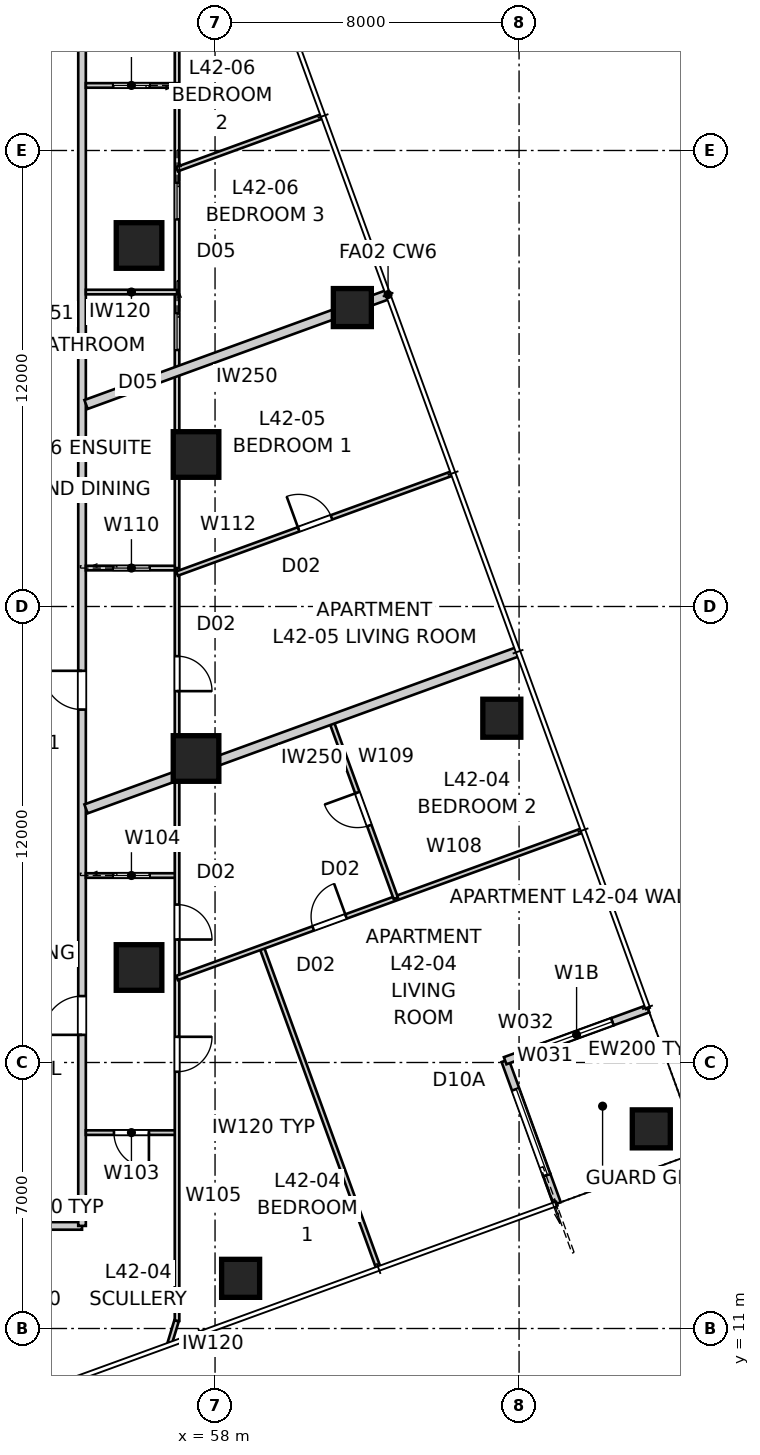
"""IFC4 building model, lengths in metres.
Left out: names, types, materials, properties, quantities, classifications, styles, units other than length and angle.
Written with IfcOpenShell. Run it as: python <this file> out.ifc"""

import sys

from ifc_helpers import new_model, si_unit, direction, frame, frame_2d, origin, origin_2d, place, context, subcontext, project, spatial, rectangle, extrude, element, fill, save


model = new_model("IFC4")
c1 = context("Model", 3, precision=1e-05, world=origin(), true_north=direction((0.0, 1.0)))
c2 = subcontext(c1, "Body", "Model", "MODEL_VIEW")
j1 = project(units=[si_unit("LENGTHUNIT", "METRE"), si_unit("PLANEANGLEUNIT", "RADIAN")], contexts=[c1])
p1 = place(None, origin())
s1 = spatial("IfcSite", under=j1, at=p1, CompositionType="ELEMENT")
p2 = place(p1, origin())
s2 = spatial("IfcBuilding", under=s1, at=p2, CompositionType="ELEMENT")
p3 = place(p2, frame((0.0, 0.0, 154.0)))
s3 = spatial("IfcBuildingStorey", under=s2, at=p3, CompositionType="ELEMENT", Elevation=154.0)
for number, where, z_axis, x_axis in (
    (1, (58.673, 12.32, 0.0), (0.0, 0.0, 1.0), (1.0, 0.0, 0.0)),
    (2, (69.479, 16.253, 0.0), (0.0, 0.0, 1.0), (1.0, 0.0, 0.0)),
    (3, (65.546, 27.06, 0.0), (0.0, 0.0, 1.0), (1.0, 0.0, 0.0)),
    (4, (61.613, 37.866, 0.0), (0.0, 0.0, 1.0), (1.0, 0.0, 0.0)),
):
    element("IfcColumn", number, at=place(p3, frame(where, z_axis=z_axis, x_axis=x_axis)), inside=s3, PredefinedType="COLUMN", context=c2, shape_type="SweptSolid", body=[
        extrude(rectangle(XDim=1.0, YDim=1.0, at=origin_2d()), origin(), (0.0, 0.0, 1.0), 3.4),
    ])
for number, where, z_axis, x_axis in (
    (5, (57.5, 26.0, 0.0), (0.0, 0.0, 1.0), (1.0, 0.0, 0.0)),
    (6, (57.5, 34.0, 0.0), (0.0, 0.0, 1.0), (1.0, 0.0, 0.0)),
    (7, (56.0, 39.5, 0.0), (0.0, 0.0, 1.0), (1.0, 0.0, 0.0)),
    (8, (56.0, 20.5, 0.0), (0.0, 0.0, 1.0), (1.0, 0.0, 0.0)),
):
    element("IfcColumn", number, at=place(p3, frame(where, z_axis=z_axis, x_axis=x_axis)), inside=s3, PredefinedType="COLUMN", context=c2, shape_type="SweptSolid", body=[
        extrude(rectangle(XDim=1.2, YDim=1.2, at=origin_2d()), origin(), (0.0, 0.0, 1.0), 3.4),
    ])
p4 = place(p3, frame((67.002, 14.288, 0.0), z_axis=(0.0, 0.0, 1.0), x_axis=(-0.342110593602, 0.939659694648, 0.0)))
e9 = element("IfcWall", 9, at=p4, inside=s3, PredefinedType="SOLIDWALL", context=c2, shape_type="SweptSolid", body=[
    extrude(rectangle(XDim=0.8, YDim=0.2, at=frame_2d((0.4, 0.0))), origin(), (0.0, 0.0, 1.0), 3.25),
])
p5 = place(p3, frame((66.729, 15.04, 0.0), z_axis=(0.0, 0.0, 1.0), x_axis=(-0.342018703306, 0.939693144909, 0.0)))
e10 = element("IfcWall", 10, at=p5, inside=s3, PredefinedType="SOLIDWALL", context=c2, shape_type="SweptSolid", body=[
    extrude(rectangle(XDim=3.2, YDim=0.2, at=frame_2d((1.6, 0.0))), origin(), (0.0, 0.0, 1.0), 2.721),
])
p6 = place(p5, origin())
e11 = element("IfcOpeningElement", 11, at=p6, cuts=e10, PredefinedType="OPENING", context=c2, shape_type="SweptSolid", body=[
    extrude(rectangle(XDim=2.4, YDim=2.1, at=frame_2d((1.2, 1.05))), frame((0.0, 0.11, 0.0), z_axis=(0.0, -1.0, 0.0), x_axis=(1.0, 0.0, 0.0)), (0.0, 0.0, 1.0), 0.22),
])
p7 = place(p3, frame((65.634, 18.047, 0.0), z_axis=(0.0, 0.0, 1.0), x_axis=(0.939712609717, 0.341965219194, 0.0)))
e12 = element("IfcWall", 12, at=p7, inside=s3, PredefinedType="SOLIDWALL", context=c2, shape_type="SweptSolid", body=[
    extrude(rectangle(XDim=3.0, YDim=0.2, at=frame_2d((1.5, 0.0))), origin(), (0.0, 0.0, 1.0), 2.721),
])
p8 = place(p7, frame((1.0, 0.0, 0.45)))
e13 = element("IfcOpeningElement", 13, at=p8, cuts=e12, PredefinedType="OPENING", context=c2, shape_type="SweptSolid", body=[
    extrude(rectangle(XDim=2.0, YDim=1.8, at=frame_2d((1.0, 0.9))), frame((0.0, 0.11, 0.0), z_axis=(0.0, -1.0, 0.0), x_axis=(1.0, 0.0, 0.0)), (0.0, 0.0, 1.0), 0.22),
])
p9 = place(p3, frame((68.453, 19.073, 0.0), z_axis=(0.0, 0.0, 1.0), x_axis=(0.939686455819, 0.342037080957, 0.0)))
e14 = element("IfcWall", 14, at=p9, inside=s3, PredefinedType="SOLIDWALL", context=c2, shape_type="SweptSolid", body=[
    extrude(rectangle(XDim=1.0, YDim=0.2, at=frame_2d((0.5, 0.0))), origin(), (0.0, 0.0, 1.0), 3.25),
])
p10 = place(p3, frame((49.242, 13.7, 0.0), z_axis=(0.0, 0.0, 1.0), x_axis=(1.0, 0.0, 0.0)))
e15 = element("IfcWall", 15, at=p10, inside=s3, PredefinedType="PARTITIONING", context=c2, shape_type="SweptSolid", body=[
    extrude(rectangle(XDim=5.258, YDim=0.2, at=frame_2d((2.629, 0.0))), origin(), (0.0, 0.0, 1.0), 3.25),
])
p11 = place(p3, frame((54.5, 13.7, 0.0), z_axis=(0.0, 0.0, 1.0), x_axis=(0.0, 1.0, 0.0)))
e16 = element("IfcWall", 16, at=p11, inside=s3, PredefinedType="PARTITIONING", context=c2, shape_type="SweptSolid", body=[
    extrude(rectangle(XDim=33.4, YDim=0.2, at=frame_2d((16.7, 0.0))), origin(), (0.0, 0.0, 1.0), 3.25),
])
p12 = place(p11, frame((5.028, 0.0, 0.0)))
e17 = element("IfcOpeningElement", 17, at=p12, cuts=e16, PredefinedType="OPENING", context=c2, shape_type="SweptSolid", body=[
    extrude(rectangle(XDim=1.02, YDim=2.1, at=frame_2d((0.51, 1.05))), frame((0.0, 0.11, 0.0), z_axis=(0.0, -1.0, 0.0), x_axis=(1.0, 0.0, 0.0)), (0.0, 0.0, 1.0), 0.22),
])
p13 = place(p11, frame((13.587, 0.0, 0.0)))
e18 = element("IfcOpeningElement", 18, at=p13, cuts=e16, PredefinedType="OPENING", context=c2, shape_type="SweptSolid", body=[
    extrude(rectangle(XDim=1.02, YDim=2.34, at=frame_2d((0.51, 1.17))), frame((0.0, 0.11, 0.0), z_axis=(0.0, -1.0, 0.0), x_axis=(1.0, 0.0, 0.0)), (0.0, 0.0, 1.0), 0.22),
])
p14 = place(p3, frame((62.553, 38.208, 0.0), z_axis=(0.0, 0.0, 1.0), x_axis=(-0.939695617736, -0.342011909161, 0.0)))
e19 = element("IfcWall", 19, at=p14, inside=s3, PredefinedType="PARTITIONING", context=c2, shape_type="SweptSolid", body=[
    extrude(rectangle(XDim=8.458, YDim=0.25, at=frame_2d((4.229, 0.0))), origin(), (0.0, 0.0, 1.0), 3.25),
])
p15 = place(p3, frame((65.973, 28.812, 0.0), z_axis=(0.0, 0.0, 1.0), x_axis=(-0.939693801585, -0.342016899091, 0.0)))
e20 = element("IfcWall", 20, at=p15, inside=s3, PredefinedType="PARTITIONING", context=c2, shape_type="SweptSolid", body=[
    extrude(rectangle(XDim=12.097, YDim=0.25, at=frame_2d((6.049, 0.0))), origin(), (0.0, 0.0, 1.0), 3.25),
])
p16 = place(p3, frame((57.0, 16.155, 0.0), z_axis=(0.0, 0.0, 1.0), x_axis=(-1.0, 0.0, 0.0)))
e21 = element("IfcWall", 21, at=p16, inside=s3, PredefinedType="PARTITIONING", context=c2, shape_type="SweptSolid", body=[
    extrude(rectangle(XDim=2.4, YDim=0.12, at=frame_2d((1.2, 0.0))), origin(), (0.0, 0.0, 1.0), 3.25),
])
p17 = place(p16, frame((0.74, 0.0, 0.0)))
e22 = element("IfcOpeningElement", 22, at=p17, cuts=e21, PredefinedType="OPENING", context=c2, shape_type="SweptSolid", body=[
    extrude(rectangle(XDim=0.92, YDim=2.34, at=frame_2d((0.46, 1.17))), frame((0.0, 0.07, 0.0), z_axis=(0.0, -1.0, 0.0), x_axis=(1.0, 0.0, 0.0)), (0.0, 0.0, 1.0), 0.14),
])
p18 = place(p3, frame((54.6, 22.921, 0.0), z_axis=(0.0, 0.0, 1.0), x_axis=(1.0, 0.0, 0.0)))
e23 = element("IfcWall", 23, at=p18, inside=s3, PredefinedType="PARTITIONING", context=c2, shape_type="SweptSolid", body=[
    extrude(rectangle(XDim=2.4, YDim=0.12, at=frame_2d((1.2, 0.0))), origin(), (0.0, 0.0, 1.0), 3.25),
])
p19 = place(p18, frame((0.72, 0.0, 0.0)))
e24 = element("IfcOpeningElement", 24, at=p19, cuts=e23, PredefinedType="OPENING", context=c2, shape_type="SweptSolid", body=[
    extrude(rectangle(XDim=0.96, YDim=2.1, at=frame_2d((0.48, 1.05))), frame((0.0, 0.07, 0.0), z_axis=(0.0, -1.0, 0.0), x_axis=(1.0, 0.0, 0.0)), (0.0, 0.0, 1.0), 0.14),
])
p20 = place(p3, frame((57.0, 30.92, 0.0), z_axis=(0.0, 0.0, 1.0), x_axis=(0.0, -1.0, 0.0)))
e25 = element("IfcWall", 25, at=p20, inside=s3, PredefinedType="PARTITIONING", context=c2, shape_type="SweptSolid", body=[
    extrude(rectangle(XDim=19.72, YDim=0.12, at=frame_2d((9.86, 0.0))), origin(), (0.0, 0.0, 1.0), 2.55),
])
p21 = place(p20, frame((12.243, 0.0, 0.0)))
e26 = element("IfcOpeningElement", 26, at=p21, cuts=e25, PredefinedType="OPENING", context=c2, shape_type="SweptSolid", body=[
    extrude(rectangle(XDim=0.92, YDim=2.34, at=frame_2d((0.46, 1.17))), frame((0.0, 0.07, 0.0), z_axis=(0.0, -1.0, 0.0), x_axis=(1.0, 0.0, 0.0)), (0.0, 0.0, 1.0), 0.14),
])
p22 = place(p20, frame((8.764, 0.0, 0.0)))
e27 = element("IfcOpeningElement", 27, at=p22, cuts=e25, PredefinedType="OPENING", context=c2, shape_type="SweptSolid", body=[
    extrude(rectangle(XDim=0.92, YDim=2.34, at=frame_2d((0.46, 1.17))), frame((0.0, 0.07, 0.0), z_axis=(0.0, -1.0, 0.0), x_axis=(1.0, 0.0, 0.0)), (0.0, 0.0, 1.0), 0.14),
])
p23 = place(p20, frame((2.227, 0.0, 0.0)))
e28 = element("IfcOpeningElement", 28, at=p23, cuts=e25, PredefinedType="OPENING", context=c2, shape_type="SweptSolid", body=[
    extrude(rectangle(XDim=0.92, YDim=2.34, at=frame_2d((0.46, 1.17))), frame((0.0, 0.07, 0.0), z_axis=(0.0, -1.0, 0.0), x_axis=(1.0, 0.0, 0.0)), (0.0, 0.0, 1.0), 0.14),
])
p24 = place(p3, frame((56.987, 11.2, 0.0), z_axis=(0.0, 0.0, 1.0), x_axis=(-0.290455219909, -0.956888585588, 0.0)))
e29 = element("IfcWall", 29, at=p24, inside=s3, PredefinedType="PARTITIONING", context=c2, shape_type="SweptSolid", body=[
    extrude(rectangle(XDim=0.605, YDim=0.12, at=frame_2d((0.303, 0.0))), origin(), (0.0, 0.0, 1.0), 3.25),
])
p25 = place(p3, frame((62.29, 12.615, 0.0), z_axis=(0.0, 0.0, 1.0), x_axis=(-0.342038393654, 0.939685978009, 0.0)))
e30 = element("IfcWall", 30, at=p25, inside=s3, PredefinedType="PARTITIONING", context=c2, shape_type="SweptSolid", body=[
    extrude(rectangle(XDim=8.96, YDim=0.12, at=frame_2d((4.48, 0.0))), origin(), (0.0, 0.0, 1.0), 3.25),
])
p26 = place(p3, frame((57.0, 20.225, 0.0), z_axis=(0.0, 0.0, 1.0), x_axis=(0.939693965364, 0.342016449105, 0.0)))
e31 = element("IfcWall", 31, at=p26, inside=s3, PredefinedType="PARTITIONING", context=c2, shape_type="SweptSolid", body=[
    extrude(rectangle(XDim=11.328, YDim=0.12, at=frame_2d((5.664, 0.0))), origin(), (0.0, 0.0, 1.0), 3.25),
])
p27 = place(p26, frame((3.812, 0.0, 0.0)))
e32 = element("IfcOpeningElement", 32, at=p27, cuts=e31, PredefinedType="OPENING", context=c2, shape_type="SweptSolid", body=[
    extrude(rectangle(XDim=0.92, YDim=2.34, at=frame_2d((0.46, 1.17))), frame((0.0, 0.07, 0.0), z_axis=(0.0, -1.0, 0.0), x_axis=(1.0, 0.0, 0.0)), (0.0, 0.0, 1.0), 0.14),
])
p28 = place(p3, frame((62.757, 22.32, 0.0), z_axis=(0.0, 0.0, 1.0), x_axis=(-0.341993964619, 0.939702148643, 0.0)))
e33 = element("IfcWall", 33, at=p28, inside=s3, PredefinedType="PARTITIONING", context=c2, shape_type="SweptSolid", body=[
    extrude(rectangle(XDim=5.0, YDim=0.12, at=frame_2d((2.5, 0.0))), origin(), (0.0, 0.0, 1.0), 3.25),
])
p29 = place(p28, frame((2.04, 0.0, 0.0)))
e34 = element("IfcOpeningElement", 34, at=p29, cuts=e33, PredefinedType="OPENING", context=c2, shape_type="SweptSolid", body=[
    extrude(rectangle(XDim=0.92, YDim=2.34, at=frame_2d((0.46, 1.17))), frame((0.0, 0.07, 0.0), z_axis=(0.0, -1.0, 0.0), x_axis=(1.0, 0.0, 0.0)), (0.0, 0.0, 1.0), 0.14),
])
p30 = place(p3, frame((54.6, 31.011, 0.0), z_axis=(0.0, 0.0, 1.0), x_axis=(1.0, 0.0, 0.0)))
e35 = element("IfcWall", 35, at=p30, inside=s3, PredefinedType="PARTITIONING", context=c2, shape_type="SweptSolid", body=[
    extrude(rectangle(XDim=2.4, YDim=0.12, at=frame_2d((1.2, 0.0))), origin(), (0.0, 0.0, 1.0), 3.25),
])
p31 = place(p30, frame((0.72, 0.0, 0.0)))
e36 = element("IfcOpeningElement", 36, at=p31, cuts=e35, PredefinedType="OPENING", context=c2, shape_type="SweptSolid", body=[
    extrude(rectangle(XDim=0.96, YDim=2.1, at=frame_2d((0.48, 1.05))), frame((0.0, 0.07, 0.0), z_axis=(0.0, -1.0, 0.0), x_axis=(1.0, 0.0, 0.0)), (0.0, 0.0, 1.0), 0.14),
])
p32 = place(p3, frame((57.0, 49.6, 0.0), z_axis=(0.0, 0.0, 1.0), x_axis=(0.0, -1.0, 0.0)))
e37 = element("IfcWall", 37, at=p32, inside=s3, PredefinedType="PARTITIONING", context=c2, shape_type="SweptSolid", body=[
    extrude(rectangle(XDim=18.589, YDim=0.12, at=frame_2d((9.294, 0.0))), origin(), (0.0, 0.0, 1.0), 2.55),
])
p33 = place(p32, frame((8.452, 0.0, 0.0)))
e38 = element("IfcOpeningElement", 38, at=p33, cuts=e37, PredefinedType="OPENING", context=c2, shape_type="SweptSolid", body=[
    extrude(rectangle(XDim=0.96, YDim=2.1, at=frame_2d((0.48, 1.05))), frame((0.0, 0.07, 0.0), z_axis=(0.0, -1.0, 0.0), x_axis=(1.0, 0.0, 0.0)), (0.0, 0.0, 1.0), 0.14),
])
p34 = place(p32, frame((11.889, 0.0, 0.0)))
e39 = element("IfcOpeningElement", 39, at=p34, cuts=e37, PredefinedType="OPENING", context=c2, shape_type="SweptSolid", body=[
    extrude(rectangle(XDim=0.96, YDim=2.1, at=frame_2d((0.48, 1.05))), frame((0.0, 0.07, 0.0), z_axis=(0.0, -1.0, 0.0), x_axis=(1.0, 0.0, 0.0)), (0.0, 0.0, 1.0), 0.14),
])
p35 = place(p3, frame((57.0, 30.866, 0.0), z_axis=(0.0, 0.0, 1.0), x_axis=(0.939685835373, 0.342038785519, 0.0)))
e40 = element("IfcWall", 40, at=p35, inside=s3, PredefinedType="PARTITIONING", context=c2, shape_type="SweptSolid", body=[
    extrude(rectangle(XDim=7.689, YDim=0.12, at=frame_2d((3.844, 0.0))), origin(), (0.0, 0.0, 1.0), 3.25),
])
p36 = place(p35, frame((3.404, 0.0, 0.0)))
e41 = element("IfcOpeningElement", 41, at=p36, cuts=e40, PredefinedType="OPENING", context=c2, shape_type="SweptSolid", body=[
    extrude(rectangle(XDim=0.92, YDim=2.34, at=frame_2d((0.46, 1.17))), frame((0.0, 0.07, 0.0), z_axis=(0.0, -1.0, 0.0), x_axis=(1.0, 0.0, 0.0)), (0.0, 0.0, 1.0), 0.14),
])
p37 = place(p3, frame((57.0, 43.712, 0.0), z_axis=(0.0, 0.0, 1.0), x_axis=(-1.0, 0.0, 0.0)))
e42 = element("IfcWall", 42, at=p37, inside=s3, PredefinedType="PARTITIONING", context=c2, shape_type="SweptSolid", body=[
    extrude(rectangle(XDim=2.4, YDim=0.12, at=frame_2d((1.2, 0.0))), origin(), (0.0, 0.0, 1.0), 3.25),
])
p38 = place(p37, frame((0.72, 0.0, 0.0)))
e43 = element("IfcOpeningElement", 43, at=p38, cuts=e42, PredefinedType="OPENING", context=c2, shape_type="SweptSolid", body=[
    extrude(rectangle(XDim=0.96, YDim=2.1, at=frame_2d((0.48, 1.05))), frame((0.0, 0.07, 0.0), z_axis=(0.0, -1.0, 0.0), x_axis=(1.0, 0.0, 0.0)), (0.0, 0.0, 1.0), 0.14),
])
p39 = place(p3, frame((57.0, 38.275, 0.0), z_axis=(0.0, 0.0, 1.0), x_axis=(-1.0, 0.0, 0.0)))
e44 = element("IfcWall", 44, at=p39, inside=s3, PredefinedType="PARTITIONING", context=c2, shape_type="SweptSolid", body=[
    extrude(rectangle(XDim=2.4, YDim=0.12, at=frame_2d((1.2, 0.0))), origin(), (0.0, 0.0, 1.0), 3.25),
])
p40 = place(p3, frame((60.805, 42.893, 0.0), z_axis=(0.0, 0.0, 1.0), x_axis=(-0.939682468191, -0.342048036063, 0.0)))
e45 = element("IfcWall", 45, at=p40, inside=s3, PredefinedType="PARTITIONING", context=c2, shape_type="SweptSolid", body=[
    extrude(rectangle(XDim=4.049, YDim=0.12, at=frame_2d((2.024, 0.0))), origin(), (0.0, 0.0, 1.0), 3.25),
])
p41 = place(p6, origin())
e46 = element("IfcDoor", 46, at=p41, inside=s3, OperationType="SLIDING_TO_LEFT", PredefinedType="DOOR", context=c2, shape_type="SweptSolid", body=[
    extrude(rectangle(XDim=2.4, YDim=2.1, at=frame_2d((1.2, 1.05))), frame((0.0, 0.025, 0.0), z_axis=(0.0, -1.0, 0.0), x_axis=(1.0, 0.0, 0.0)), (0.0, 0.0, 1.0), 0.05),
])
fill(e11, e46)
p42 = place(p8, origin())
e47 = element("IfcWindow", 47, at=p42, inside=s3, PartitioningType="SINGLE_PANEL", PredefinedType="WINDOW", context=c2, shape_type="SweptSolid", body=[
    extrude(rectangle(XDim=2.0, YDim=1.8, at=frame_2d((1.0, 0.9))), frame((0.0, 0.03, 0.0), z_axis=(0.0, -1.0, 0.0), x_axis=(1.0, 0.0, 0.0)), (0.0, 0.0, 1.0), 0.06),
])
fill(e13, e47)
p43 = place(p12, origin())
e48 = element("IfcDoor", 48, at=p43, inside=s3, OperationType="SINGLE_SWING_LEFT", PredefinedType="DOOR", context=c2, shape_type="SweptSolid", body=[
    extrude(rectangle(XDim=1.02, YDim=2.1, at=frame_2d((0.51, 1.05))), frame((0.0, 0.025, 0.0), z_axis=(0.0, -1.0, 0.0), x_axis=(1.0, 0.0, 0.0)), (0.0, 0.0, 1.0), 0.05),
])
fill(e17, e48)
p44 = place(p13, origin())
e49 = element("IfcDoor", 49, at=p44, inside=s3, OperationType="SINGLE_SWING_RIGHT", PredefinedType="DOOR", context=c2, shape_type="SweptSolid", body=[
    extrude(rectangle(XDim=1.02, YDim=2.34, at=frame_2d((0.51, 1.17))), frame((0.0, 0.025, 0.0), z_axis=(0.0, -1.0, 0.0), x_axis=(1.0, 0.0, 0.0)), (0.0, 0.0, 1.0), 0.05),
])
fill(e18, e49)
p45 = place(p38, origin())
e50 = element("IfcDoor", 50, at=p45, inside=s3, OperationType="SLIDING_TO_LEFT", PredefinedType="DOOR", context=c2, shape_type="SweptSolid", body=[
    extrude(rectangle(XDim=0.96, YDim=2.1, at=frame_2d((0.48, 1.05))), frame((0.0, 0.025, 0.0), z_axis=(0.0, -1.0, 0.0), x_axis=(1.0, 0.0, 0.0)), (0.0, 0.0, 1.0), 0.05),
])
fill(e43, e50)
p46 = place(p21, origin())
e51 = element("IfcDoor", 51, at=p46, inside=s3, OperationType="SINGLE_SWING_LEFT", PredefinedType="DOOR", context=c2, shape_type="SweptSolid", body=[
    extrude(rectangle(XDim=0.92, YDim=2.34, at=frame_2d((0.46, 1.17))), frame((0.0, 0.025, 0.0), z_axis=(0.0, -1.0, 0.0), x_axis=(1.0, 0.0, 0.0)), (0.0, 0.0, 1.0), 0.05),
])
fill(e26, e51)
p47 = place(p22, origin())
e52 = element("IfcDoor", 52, at=p47, inside=s3, OperationType="SINGLE_SWING_RIGHT", PredefinedType="DOOR", context=c2, shape_type="SweptSolid", body=[
    extrude(rectangle(XDim=0.92, YDim=2.34, at=frame_2d((0.46, 1.17))), frame((0.0, 0.025, 0.0), z_axis=(0.0, -1.0, 0.0), x_axis=(1.0, 0.0, 0.0)), (0.0, 0.0, 1.0), 0.05),
])
fill(e27, e52)
p48 = place(p17, origin())
e53 = element("IfcDoor", 53, at=p48, inside=s3, OperationType="SINGLE_SWING_LEFT", PredefinedType="DOOR", context=c2, shape_type="SweptSolid", body=[
    extrude(rectangle(XDim=0.92, YDim=2.34, at=frame_2d((0.46, 1.17))), frame((0.0, 0.025, 0.0), z_axis=(0.0, -1.0, 0.0), x_axis=(1.0, 0.0, 0.0)), (0.0, 0.0, 1.0), 0.05),
])
fill(e22, e53)
p49 = place(p19, origin())
e54 = element("IfcDoor", 54, at=p49, inside=s3, OperationType="SLIDING_TO_LEFT", PredefinedType="DOOR", context=c2, shape_type="SweptSolid", body=[
    extrude(rectangle(XDim=0.96, YDim=2.1, at=frame_2d((0.48, 1.05))), frame((0.0, 0.025, 0.0), z_axis=(0.0, -1.0, 0.0), x_axis=(1.0, 0.0, 0.0)), (0.0, 0.0, 1.0), 0.05),
])
fill(e24, e54)
p50 = place(p23, origin())
e55 = element("IfcDoor", 55, at=p50, inside=s3, OperationType="SINGLE_SWING_RIGHT", PredefinedType="DOOR", context=c2, shape_type="SweptSolid", body=[
    extrude(rectangle(XDim=0.92, YDim=2.34, at=frame_2d((0.46, 1.17))), frame((0.0, 0.025, 0.0), z_axis=(0.0, -1.0, 0.0), x_axis=(1.0, 0.0, 0.0)), (0.0, 0.0, 1.0), 0.05),
])
fill(e28, e55)
p51 = place(p31, origin())
e56 = element("IfcDoor", 56, at=p51, inside=s3, OperationType="SLIDING_TO_LEFT", PredefinedType="DOOR", context=c2, shape_type="SweptSolid", body=[
    extrude(rectangle(XDim=0.96, YDim=2.1, at=frame_2d((0.48, 1.05))), frame((0.0, 0.025, 0.0), z_axis=(0.0, -1.0, 0.0), x_axis=(1.0, 0.0, 0.0)), (0.0, 0.0, 1.0), 0.05),
])
fill(e36, e56)
p52 = place(p33, origin())
e57 = element("IfcDoor", 57, at=p52, inside=s3, OperationType="SLIDING_TO_LEFT", PredefinedType="DOOR", context=c2, shape_type="SweptSolid", body=[
    extrude(rectangle(XDim=0.96, YDim=2.1, at=frame_2d((0.48, 1.05))), frame((0.0, 0.025, 0.0), z_axis=(0.0, -1.0, 0.0), x_axis=(1.0, 0.0, 0.0)), (0.0, 0.0, 1.0), 0.05),
])
fill(e38, e57)
p53 = place(p29, origin())
e58 = element("IfcDoor", 58, at=p53, inside=s3, OperationType="SINGLE_SWING_RIGHT", PredefinedType="DOOR", context=c2, shape_type="SweptSolid", body=[
    extrude(rectangle(XDim=0.92, YDim=2.34, at=frame_2d((0.46, 1.17))), frame((0.0, 0.025, 0.0), z_axis=(0.0, -1.0, 0.0), x_axis=(1.0, 0.0, 0.0)), (0.0, 0.0, 1.0), 0.05),
])
fill(e34, e58)
p54 = place(p27, origin())
e59 = element("IfcDoor", 59, at=p54, inside=s3, OperationType="SINGLE_SWING_RIGHT", PredefinedType="DOOR", context=c2, shape_type="SweptSolid", body=[
    extrude(rectangle(XDim=0.92, YDim=2.34, at=frame_2d((0.46, 1.17))), frame((0.0, 0.025, 0.0), z_axis=(0.0, -1.0, 0.0), x_axis=(1.0, 0.0, 0.0)), (0.0, 0.0, 1.0), 0.05),
])
fill(e32, e59)
p55 = place(p36, origin())
e60 = element("IfcDoor", 60, at=p55, inside=s3, OperationType="SINGLE_SWING_LEFT", PredefinedType="DOOR", context=c2, shape_type="SweptSolid", body=[
    extrude(rectangle(XDim=0.92, YDim=2.34, at=frame_2d((0.46, 1.17))), frame((0.0, 0.025, 0.0), z_axis=(0.0, -1.0, 0.0), x_axis=(1.0, 0.0, 0.0)), (0.0, 0.0, 1.0), 0.05),
])
fill(e41, e60)
p56 = place(p34, origin())
e61 = element("IfcDoor", 61, at=p56, inside=s3, OperationType="SLIDING_TO_LEFT", PredefinedType="DOOR", context=c2, shape_type="SweptSolid", body=[
    extrude(rectangle(XDim=0.96, YDim=2.1, at=frame_2d((0.48, 1.05))), frame((0.0, 0.025, 0.0), z_axis=(0.0, -1.0, 0.0), x_axis=(1.0, 0.0, 0.0)), (0.0, 0.0, 1.0), 0.05),
])
fill(e39, e61)
save(model, sys.argv[1])
